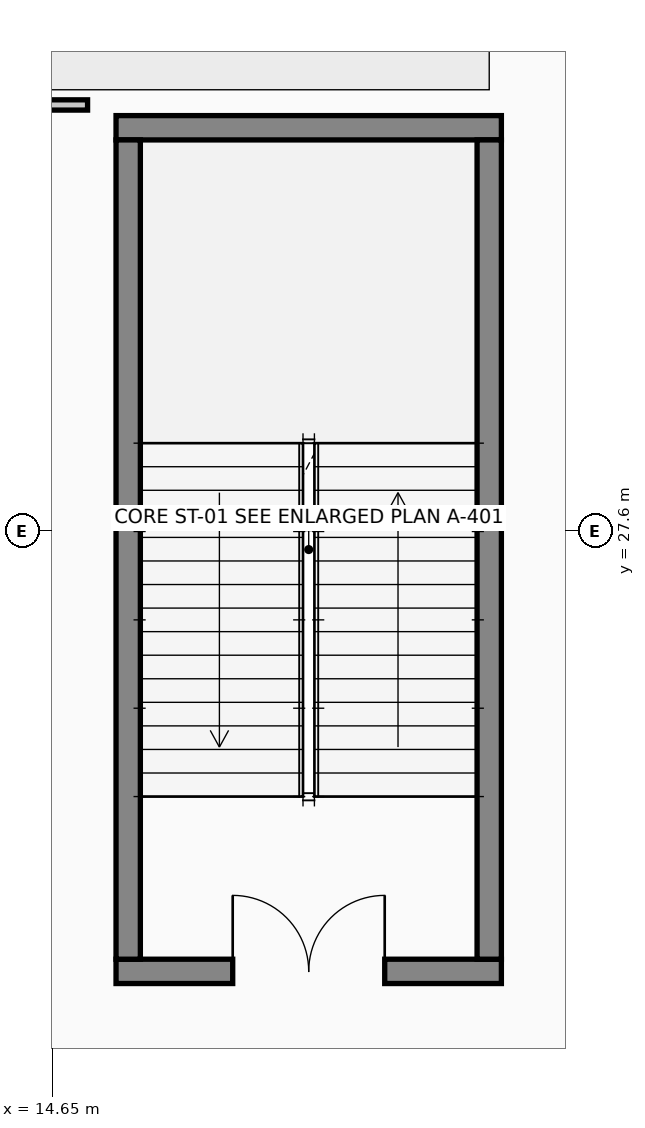
"""IFC4 building model, lengths in metres.
Left out: names, types, materials, properties, quantities, classifications, styles, units other than length and angle.
Written with IfcOpenShell. Run it as: python <this file> out.ifc"""

import sys

from ifc_helpers import new_model, si_unit, direction, frame, frame_2d, origin, place, context, subcontext, project, spatial, rectangle, extrude, element, fill, save


model = new_model("IFC4")
c1 = context("Model", 3, precision=1e-05, world=origin(), true_north=direction((0.0, 1.0)))
c2 = subcontext(c1, "Body", "Model", "MODEL_VIEW")
j1 = project(units=[si_unit("LENGTHUNIT", "METRE"), si_unit("PLANEANGLEUNIT", "RADIAN")], contexts=[c1])
p1 = place(None, origin())
s1 = spatial("IfcSite", under=j1, at=p1, CompositionType="ELEMENT")
p2 = place(p1, origin())
s2 = spatial("IfcBuilding", under=s1, at=p2, CompositionType="ELEMENT")
p3 = place(p2, frame((0.0, 0.0, 4.8)))
s3 = spatial("IfcBuildingStorey", under=s2, at=p3, CompositionType="ELEMENT", Elevation=4.8)
p4 = place(p3, frame((15.49, 21.8, 0.0), z_axis=(0.0, 0.0, 1.0), x_axis=(1.0, 0.0, 0.0)))
e1 = element("IfcWall", 1, at=p4, inside=s3, PredefinedType="SHEAR", context=c2, shape_type="SweptSolid", body=[
    extrude(rectangle(XDim=5.07, YDim=0.32, at=frame_2d((2.535, 0.0))), origin(), (0.0, 0.0, 1.0), 4.56),
])
p5 = place(p4, frame((1.535, 0.0, 0.0)))
e2 = element("IfcOpeningElement", 2, at=p5, cuts=e1, PredefinedType="OPENING", context=c2, shape_type="SweptSolid", body=[
    extrude(rectangle(XDim=2.0, YDim=2.15, at=frame_2d((1.0, 1.075))), frame((0.0, 0.17, 0.0), z_axis=(0.0, -1.0, 0.0), x_axis=(1.0, 0.0, 0.0)), (0.0, 0.0, 1.0), 0.34),
])
p6 = place(p3, frame((15.49, 32.9, 0.0), z_axis=(0.0, 0.0, 1.0), x_axis=(1.0, 0.0, 0.0)))
e3 = element("IfcWall", 3, at=p6, inside=s3, PredefinedType="SHEAR", context=c2, shape_type="SweptSolid", body=[
    extrude(rectangle(XDim=5.07, YDim=0.32, at=frame_2d((2.535, 0.0))), origin(), (0.0, 0.0, 1.0), 4.56),
])
for number, where, z_axis, x_axis in (
    (4, (15.65, 21.96, 0.0), (0.0, 0.0, 1.0), (0.0, 1.0, 0.0)),
    (5, (20.4, 21.96, 0.0), (0.0, 0.0, 1.0), (0.0, 1.0, 0.0)),
):
    element("IfcWall", number, at=place(p3, frame(where, z_axis=z_axis, x_axis=x_axis)), inside=s3, PredefinedType="SHEAR", context=c2, shape_type="SweptSolid", body=[
        extrude(rectangle(XDim=10.78, YDim=0.32, at=frame_2d((5.39, 0.0))), origin(), (0.0, 0.0, 1.0), 4.56),
    ])
p7 = place(p3, frame((0.82, 33.2, 0.0), z_axis=(0.0, 0.0, 1.0), x_axis=(1.0, 0.0, 0.0)))
e6 = element("IfcWall", 6, at=p7, inside=s3, PredefinedType="PARTITIONING", context=c2, shape_type="SweptSolid", body=[
    extrude(rectangle(XDim=14.295, YDim=0.135, at=frame_2d((7.148, 0.0))), origin(), (0.0, 0.0, 1.0), 4.545),
])
p8 = place(p7, frame((6.648, 0.0, 0.0)))
e7 = element("IfcOpeningElement", 7, at=p8, cuts=e6, PredefinedType="OPENING", context=c2, shape_type="SweptSolid", body=[
    extrude(rectangle(XDim=1.0, YDim=2.1, at=frame_2d((0.5, 1.05))), frame((0.0, 0.077, 0.0), z_axis=(0.0, -1.0, 0.0), x_axis=(1.0, 0.0, 0.0)), (0.0, 0.0, 1.0), 0.155),
])
p9 = place(p7, frame((8.548, 0.0, 0.0)))
e8 = element("IfcOpeningElement", 8, at=p9, cuts=e6, PredefinedType="OPENING", context=c2, shape_type="SweptSolid", body=[
    extrude(rectangle(XDim=1.0, YDim=2.1, at=frame_2d((0.5, 1.05))), frame((0.0, 0.077, 0.0), z_axis=(0.0, -1.0, 0.0), x_axis=(1.0, 0.0, 0.0)), (0.0, 0.0, 1.0), 0.155),
])
p10 = place(p5, origin())
e9 = element("IfcDoor", 9, at=p10, inside=s3, OperationType="DOUBLE_DOOR_SINGLE_SWING", PredefinedType="DOOR", context=c2, shape_type="SweptSolid", body=[
    extrude(rectangle(XDim=2.0, YDim=2.15, at=frame_2d((1.0, 1.075))), frame((0.0, 0.025, 0.0), z_axis=(0.0, -1.0, 0.0), x_axis=(1.0, 0.0, 0.0)), (0.0, 0.0, 1.0), 0.05),
])
fill(e2, e9)
save(model, sys.argv[1])
